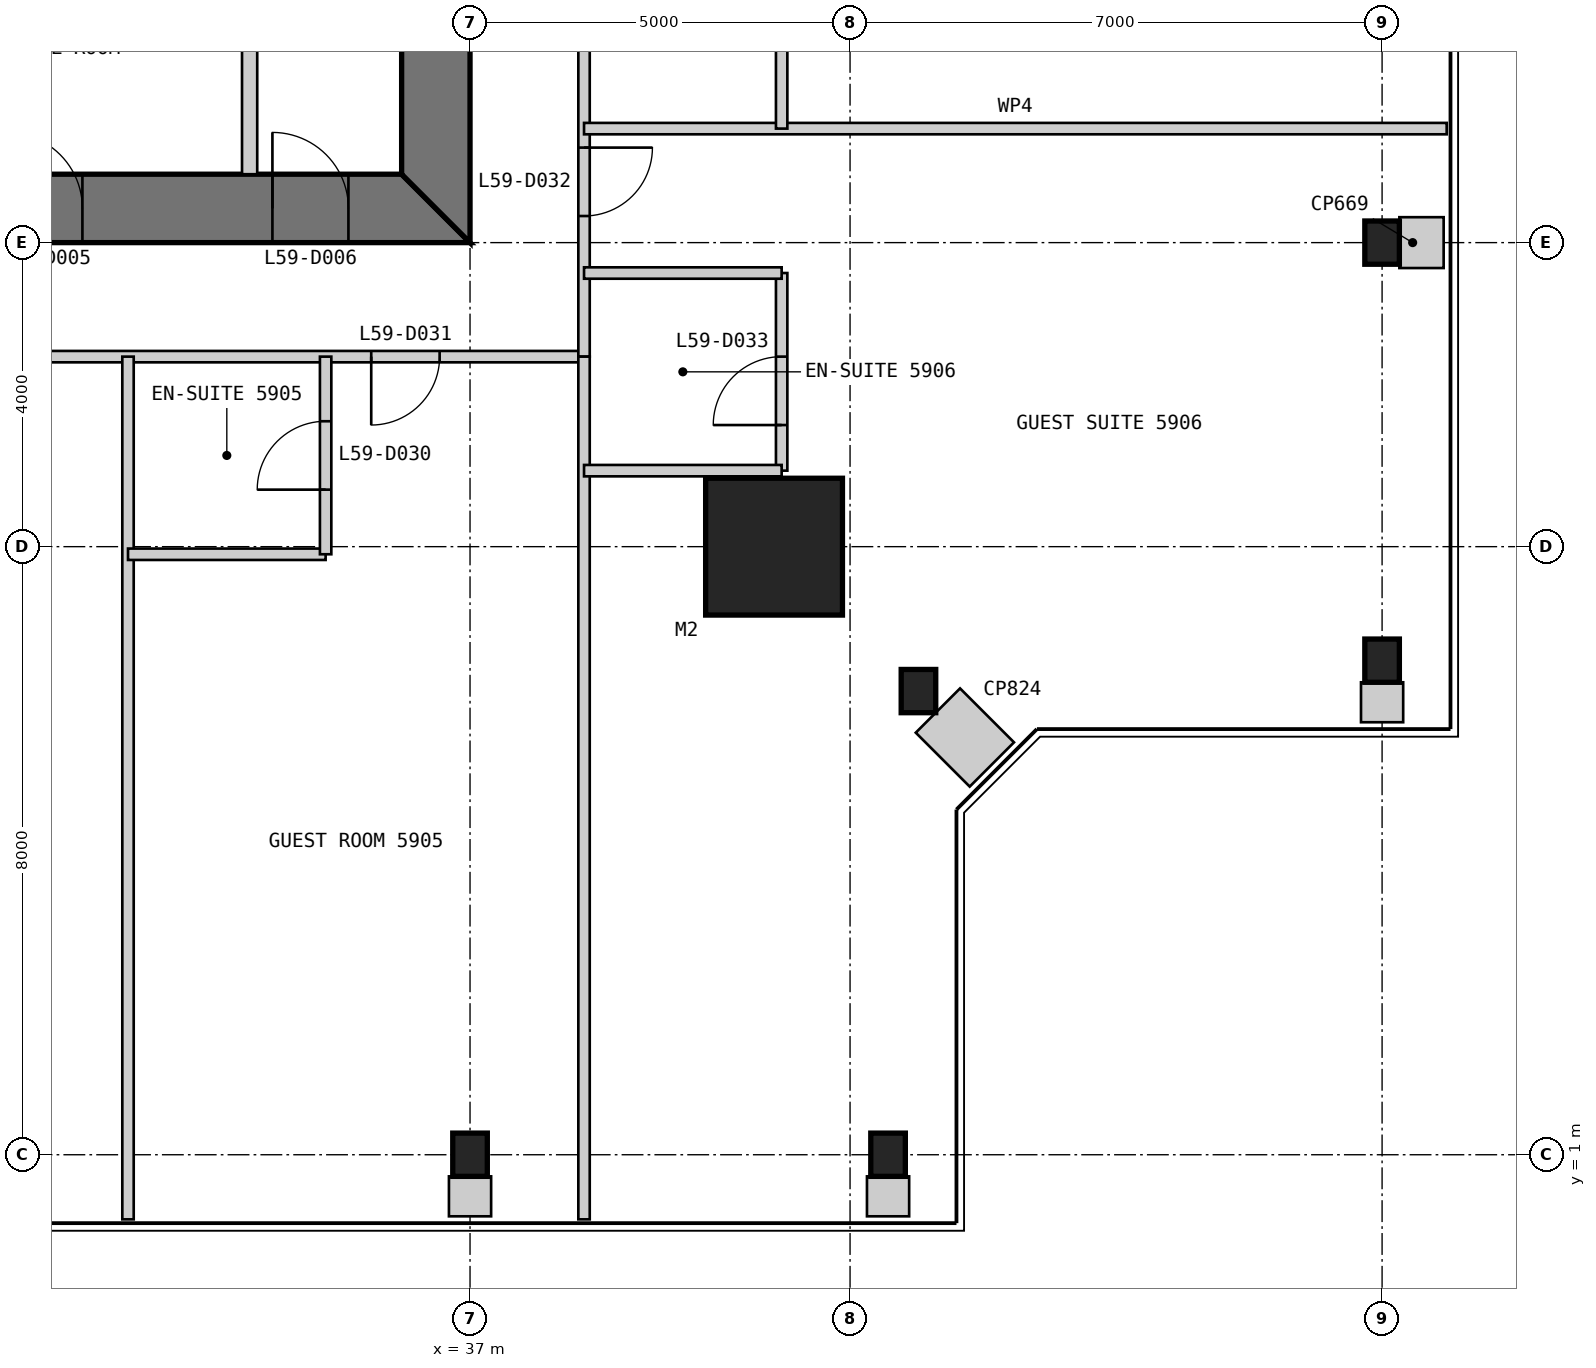
"""IFC4 building model, lengths in metres.
Left out: names, types, materials, properties, quantities, classifications, styles, units other than length and angle.
Written with IfcOpenShell. Run it as: python <this file> out.ifc"""

import sys

from ifc_helpers import new_model, si_unit, direction, frame, frame_2d, origin, origin_2d, place, context, subcontext, project, spatial, polyline, rectangle, i_section, outline, extrude, element, fill, save


model = new_model("IFC4")
c1 = context("Model", 3, precision=1e-05, world=origin(), true_north=direction((0.0, 1.0)))
c2 = subcontext(c1, "Body", "Model", "MODEL_VIEW")
j1 = project(units=[si_unit("LENGTHUNIT", "METRE"), si_unit("PLANEANGLEUNIT", "RADIAN")], contexts=[c1])
p1 = place(None, origin())
s1 = spatial("IfcSite", under=j1, at=p1, CompositionType="ELEMENT")
p2 = place(p1, origin())
s2 = spatial("IfcBuilding", under=s1, at=p2, CompositionType="ELEMENT")
p3 = place(p2, frame((0.0, 0.0, 252.6)))
s3 = spatial("IfcBuildingStorey", under=s2, at=p3, CompositionType="ELEMENT", Elevation=252.6)
p4 = place(p3, frame((41.0, 9.0, 0.0), z_axis=(0.0, 0.0, 1.0), x_axis=(1.0, 0.0, 0.0)))
e1 = element("IfcColumn", 1, at=p4, inside=s3, PredefinedType="COLUMN", context=c2, shape_type="SweptSolid", body=[
    extrude(rectangle(XDim=1.8, YDim=1.8, at=origin_2d()), origin(), (0.0, 0.0, 1.0), 3.4),
])
for number, where, z_axis, x_axis in (
    (2, (37.0, 1.0, 0.0), (0.0, 0.0, 1.0), (1.0, 0.0, 0.0)),
    (3, (42.5, 1.0, 0.0), (0.0, 0.0, 1.0), (1.0, 0.0, 0.0)),
    (4, (42.9, 7.1, 0.0), (0.0, 0.0, 1.0), (1.0, 0.0, 0.0)),
    (5, (49.0, 7.5, 0.0), (0.0, 0.0, 1.0), (1.0, 0.0, 0.0)),
    (6, (49.0, 13.0, 0.0), (0.0, 0.0, 1.0), (1.0, 0.0, 0.0)),
):
    element("IfcColumn", number, at=place(p3, frame(where, z_axis=z_axis, x_axis=x_axis)), inside=s3, PredefinedType="COLUMN", context=c2, shape_type="SweptSolid", body=[
        extrude(i_section(OverallWidth=0.455, OverallDepth=0.569, WebThickness=0.078, FlangeThickness=0.125, at=origin_2d()), origin(), (0.0, 0.0, 1.0), 3.4),
    ])
p5 = place(p3, frame((13.0, 13.45, 0.0), z_axis=(0.0, 0.0, 1.0), x_axis=(1.0, 0.0, 0.0)))
e7 = element("IfcWall", 7, at=p5, inside=s3, PredefinedType="SHEAR", context=c2, shape_type="SweptSolid", body=[
    extrude(outline(polyline([(0.0, -0.45), (24.0, -0.45), (23.1, 0.45), (0.9, 0.45), (0.0, -0.45)])), origin(), (0.0, 0.0, 1.0), 3.4),
])
p6 = place(p5, frame((4.9, 0.0, 0.0)))
e8 = element("IfcOpeningElement", 8, at=p6, cuts=e7, PredefinedType="OPENING", context=c2, shape_type="SweptSolid", body=[
    extrude(rectangle(XDim=1.0, YDim=2.2, at=frame_2d((0.5, 1.1))), frame((0.0, 0.46, 0.0), z_axis=(0.0, -1.0, 0.0), x_axis=(1.0, 0.0, 0.0)), (0.0, 0.0, 1.0), 0.92),
])
p7 = place(p5, frame((8.9, 0.0, 0.0)))
e9 = element("IfcOpeningElement", 9, at=p7, cuts=e7, PredefinedType="OPENING", context=c2, shape_type="SweptSolid", body=[
    extrude(rectangle(XDim=1.1, YDim=2.2, at=frame_2d((0.55, 1.1))), frame((0.0, 0.46, 0.0), z_axis=(0.0, -1.0, 0.0), x_axis=(1.0, 0.0, 0.0)), (0.0, 0.0, 1.0), 0.92),
])
p8 = place(p5, frame((15.05, 0.0, 0.0)))
e10 = element("IfcOpeningElement", 10, at=p8, cuts=e7, PredefinedType="OPENING", context=c2, shape_type="SweptSolid", body=[
    extrude(rectangle(XDim=0.9, YDim=2.2, at=frame_2d((0.45, 1.1))), frame((0.0, 0.46, 0.0), z_axis=(0.0, -1.0, 0.0), x_axis=(1.0, 0.0, 0.0)), (0.0, 0.0, 1.0), 0.92),
])
p9 = place(p5, frame((17.9, 0.0, 0.0)))
e11 = element("IfcOpeningElement", 11, at=p9, cuts=e7, PredefinedType="OPENING", context=c2, shape_type="SweptSolid", body=[
    extrude(rectangle(XDim=1.0, YDim=2.2, at=frame_2d((0.5, 1.1))), frame((0.0, 0.46, 0.0), z_axis=(0.0, -1.0, 0.0), x_axis=(1.0, 0.0, 0.0)), (0.0, 0.0, 1.0), 0.92),
])
p10 = place(p5, frame((21.4, 0.0, 0.0)))
e12 = element("IfcOpeningElement", 12, at=p10, cuts=e7, PredefinedType="OPENING", context=c2, shape_type="SweptSolid", body=[
    extrude(rectangle(XDim=1.0, YDim=2.2, at=frame_2d((0.5, 1.1))), frame((0.0, 0.46, 0.0), z_axis=(0.0, -1.0, 0.0), x_axis=(1.0, 0.0, 0.0)), (0.0, 0.0, 1.0), 0.92),
])
p11 = place(p3, frame((36.55, 13.9, 0.0), z_axis=(0.0, 0.0, 1.0), x_axis=(0.0, 1.0, 0.0)))
e13 = element("IfcWall", 13, at=p11, inside=s3, PredefinedType="SHEAR", context=c2, shape_type="SweptSolid", body=[
    extrude(outline(polyline([(-0.9, -0.45), (23.1, -0.45), (22.2, 0.45), (0.0, 0.45), (-0.9, -0.45)])), origin(), (0.0, 0.0, 1.0), 3.4),
])
p12 = place(p11, frame((20.2, 0.0, 0.0)))
e14 = element("IfcOpeningElement", 14, at=p12, cuts=e13, PredefinedType="OPENING", context=c2, shape_type="SweptSolid", body=[
    extrude(rectangle(XDim=1.0, YDim=2.2, at=frame_2d((0.5, 1.1))), frame((0.0, 0.46, 0.0), z_axis=(0.0, -1.0, 0.0), x_axis=(1.0, 0.0, 0.0)), (0.0, 0.0, 1.0), 0.92),
])
p13 = place(p11, frame((17.25, 0.0, 0.0)))
e15 = element("IfcOpeningElement", 15, at=p13, cuts=e13, PredefinedType="OPENING", context=c2, shape_type="SweptSolid", body=[
    extrude(rectangle(XDim=0.9, YDim=2.2, at=frame_2d((0.45, 1.1))), frame((0.0, 0.46, 0.0), z_axis=(0.0, -1.0, 0.0), x_axis=(1.0, 0.0, 0.0)), (0.0, 0.0, 1.0), 0.92),
])
p14 = place(p3, frame((34.1, 13.9, 0.0), z_axis=(0.0, 0.0, 1.0), x_axis=(0.0, 1.0, 0.0)))
e16 = element("IfcWall", 16, at=p14, inside=s3, PredefinedType="PARTITIONING", context=c2, shape_type="SweptSolid", body=[
    extrude(rectangle(XDim=6.1, YDim=0.2, at=frame_2d((3.05, 0.0))), origin(), (0.0, 0.0, 1.0), 3.2),
])
p15 = place(p3, frame((11.5, 11.5, 0.0), z_axis=(0.0, 0.0, 1.0), x_axis=(1.0, 0.0, 0.0)))
e17 = element("IfcWall", 17, at=p15, inside=s3, PredefinedType="PARTITIONING", context=c2, shape_type="SweptSolid", body=[
    extrude(rectangle(XDim=27.0, YDim=0.15, at=frame_2d((13.5, 0.0))), origin(), (0.0, 0.0, 1.0), 3.25),
])
p16 = place(p15, frame((1.85, 0.0, 0.0)))
e18 = element("IfcOpeningElement", 18, at=p16, cuts=e17, PredefinedType="OPENING", context=c2, shape_type="SweptSolid", body=[
    extrude(rectangle(XDim=0.9, YDim=2.1, at=frame_2d((0.45, 1.05))), frame((0.0, 0.085, 0.0), z_axis=(0.0, -1.0, 0.0), x_axis=(1.0, 0.0, 0.0)), (0.0, 0.0, 1.0), 0.17),
])
p17 = place(p15, frame((6.2, 0.0, 0.0)))
e19 = element("IfcOpeningElement", 19, at=p17, cuts=e17, PredefinedType="OPENING", context=c2, shape_type="SweptSolid", body=[
    extrude(rectangle(XDim=0.9, YDim=2.1, at=frame_2d((0.45, 1.05))), frame((0.0, 0.085, 0.0), z_axis=(0.0, -1.0, 0.0), x_axis=(1.0, 0.0, 0.0)), (0.0, 0.0, 1.0), 0.17),
])
p18 = place(p15, frame((12.2, 0.0, 0.0)))
e20 = element("IfcOpeningElement", 20, at=p18, cuts=e17, PredefinedType="OPENING", context=c2, shape_type="SweptSolid", body=[
    extrude(rectangle(XDim=0.9, YDim=2.1, at=frame_2d((0.45, 1.05))), frame((0.0, 0.085, 0.0), z_axis=(0.0, -1.0, 0.0), x_axis=(1.0, 0.0, 0.0)), (0.0, 0.0, 1.0), 0.17),
])
p19 = place(p15, frame((18.8, 0.0, 0.0)))
e21 = element("IfcOpeningElement", 21, at=p19, cuts=e17, PredefinedType="OPENING", context=c2, shape_type="SweptSolid", body=[
    extrude(rectangle(XDim=1.0, YDim=2.1, at=frame_2d((0.5, 1.05))), frame((0.0, 0.085, 0.0), z_axis=(0.0, -1.0, 0.0), x_axis=(1.0, 0.0, 0.0)), (0.0, 0.0, 1.0), 0.17),
])
p20 = place(p15, frame((24.2, 0.0, 0.0)))
e22 = element("IfcOpeningElement", 22, at=p20, cuts=e17, PredefinedType="OPENING", context=c2, shape_type="SweptSolid", body=[
    extrude(rectangle(XDim=0.9, YDim=2.1, at=frame_2d((0.45, 1.05))), frame((0.0, 0.085, 0.0), z_axis=(0.0, -1.0, 0.0), x_axis=(1.0, 0.0, 0.0)), (0.0, 0.0, 1.0), 0.17),
])
p21 = place(p3, frame((32.5, 0.15, 0.0), z_axis=(0.0, 0.0, 1.0), x_axis=(0.0, 1.0, 0.0)))
e23 = element("IfcWall", 23, at=p21, inside=s3, PredefinedType="PARTITIONING", context=c2, shape_type="SweptSolid", body=[
    extrude(rectangle(XDim=11.35, YDim=0.15, at=frame_2d((5.675, 0.0))), origin(), (0.0, 0.0, 1.0), 3.25),
])
p22 = place(p3, frame((32.5, 8.9, 0.0), z_axis=(0.0, 0.0, 1.0), x_axis=(1.0, 0.0, 0.0)))
e24 = element("IfcWall", 24, at=p22, inside=s3, PredefinedType="PARTITIONING", context=c2, shape_type="SweptSolid", body=[
    extrude(rectangle(XDim=2.6, YDim=0.15, at=frame_2d((1.3, 0.0))), origin(), (0.0, 0.0, 1.0), 3.25),
])
p23 = place(p3, frame((35.1, 8.9, 0.0), z_axis=(0.0, 0.0, 1.0), x_axis=(0.0, 1.0, 0.0)))
e25 = element("IfcWall", 25, at=p23, inside=s3, PredefinedType="PARTITIONING", context=c2, shape_type="SweptSolid", body=[
    extrude(rectangle(XDim=2.6, YDim=0.15, at=frame_2d((1.3, 0.0))), origin(), (0.0, 0.0, 1.0), 3.25),
])
p24 = place(p23, frame((0.85, 0.0, 0.0)))
e26 = element("IfcOpeningElement", 26, at=p24, cuts=e25, PredefinedType="OPENING", context=c2, shape_type="SweptSolid", body=[
    extrude(rectangle(XDim=0.9, YDim=2.1, at=frame_2d((0.45, 1.05))), frame((0.0, 0.085, 0.0), z_axis=(0.0, -1.0, 0.0), x_axis=(1.0, 0.0, 0.0)), (0.0, 0.0, 1.0), 0.17),
])
p25 = place(p3, frame((38.5, 11.5, 0.0), z_axis=(0.0, 0.0, 1.0), x_axis=(0.0, 1.0, 0.0)))
e27 = element("IfcWall", 27, at=p25, inside=s3, PredefinedType="PARTITIONING", context=c2, shape_type="SweptSolid", body=[
    extrude(rectangle(XDim=27.0, YDim=0.15, at=frame_2d((13.5, 0.0))), origin(), (0.0, 0.0, 1.0), 3.25),
])
p26 = place(p25, frame((1.85, 0.0, 0.0)))
e28 = element("IfcOpeningElement", 28, at=p26, cuts=e27, PredefinedType="OPENING", context=c2, shape_type="SweptSolid", body=[
    extrude(rectangle(XDim=0.9, YDim=2.1, at=frame_2d((0.45, 1.05))), frame((0.0, 0.085, 0.0), z_axis=(0.0, -1.0, 0.0), x_axis=(1.0, 0.0, 0.0)), (0.0, 0.0, 1.0), 0.17),
])
p27 = place(p25, frame((6.2, 0.0, 0.0)))
e29 = element("IfcOpeningElement", 29, at=p27, cuts=e27, PredefinedType="OPENING", context=c2, shape_type="SweptSolid", body=[
    extrude(rectangle(XDim=0.9, YDim=2.1, at=frame_2d((0.45, 1.05))), frame((0.0, 0.085, 0.0), z_axis=(0.0, -1.0, 0.0), x_axis=(1.0, 0.0, 0.0)), (0.0, 0.0, 1.0), 0.17),
])
p28 = place(p25, frame((12.2, 0.0, 0.0)))
e30 = element("IfcOpeningElement", 30, at=p28, cuts=e27, PredefinedType="OPENING", context=c2, shape_type="SweptSolid", body=[
    extrude(rectangle(XDim=0.9, YDim=2.1, at=frame_2d((0.45, 1.05))), frame((0.0, 0.085, 0.0), z_axis=(0.0, -1.0, 0.0), x_axis=(1.0, 0.0, 0.0)), (0.0, 0.0, 1.0), 0.17),
])
p29 = place(p25, frame((18.2, 0.0, 0.0)))
e31 = element("IfcOpeningElement", 31, at=p29, cuts=e27, PredefinedType="OPENING", context=c2, shape_type="SweptSolid", body=[
    extrude(rectangle(XDim=0.9, YDim=2.1, at=frame_2d((0.45, 1.05))), frame((0.0, 0.085, 0.0), z_axis=(0.0, -1.0, 0.0), x_axis=(1.0, 0.0, 0.0)), (0.0, 0.0, 1.0), 0.17),
])
p30 = place(p25, frame((24.2, 0.0, 0.0)))
e32 = element("IfcOpeningElement", 32, at=p30, cuts=e27, PredefinedType="OPENING", context=c2, shape_type="SweptSolid", body=[
    extrude(rectangle(XDim=0.9, YDim=2.1, at=frame_2d((0.45, 1.05))), frame((0.0, 0.085, 0.0), z_axis=(0.0, -1.0, 0.0), x_axis=(1.0, 0.0, 0.0)), (0.0, 0.0, 1.0), 0.17),
])
p31 = place(p3, frame((38.5, 0.15, 0.0), z_axis=(0.0, 0.0, 1.0), x_axis=(0.0, 1.0, 0.0)))
e33 = element("IfcWall", 33, at=p31, inside=s3, PredefinedType="PARTITIONING", context=c2, shape_type="SweptSolid", body=[
    extrude(rectangle(XDim=11.35, YDim=0.15, at=frame_2d((5.675, 0.0))), origin(), (0.0, 0.0, 1.0), 3.25),
])
p32 = place(p3, frame((41.1, 10.0, 0.0), z_axis=(0.0, 0.0, 1.0), x_axis=(0.0, 1.0, 0.0)))
e34 = element("IfcWall", 34, at=p32, inside=s3, PredefinedType="PARTITIONING", context=c2, shape_type="SweptSolid", body=[
    extrude(rectangle(XDim=2.6, YDim=0.15, at=frame_2d((1.3, 0.0))), origin(), (0.0, 0.0, 1.0), 2.638),
])
p33 = place(p32, frame((0.6, 0.0, 0.0)))
e35 = element("IfcOpeningElement", 35, at=p33, cuts=e34, PredefinedType="OPENING", context=c2, shape_type="SweptSolid", body=[
    extrude(rectangle(XDim=0.9, YDim=2.1, at=frame_2d((0.45, 1.05))), frame((0.0, 0.085, 0.0), z_axis=(0.0, -1.0, 0.0), x_axis=(1.0, 0.0, 0.0)), (0.0, 0.0, 1.0), 0.17),
])
for number, where, z_axis, x_axis in (
    (36, (41.1, 10.0, 0.0), (0.0, 0.0, 1.0), (-1.0, 0.0, 0.0)),
    (37, (41.1, 12.6, 0.0), (0.0, 0.0, 1.0), (-1.0, 0.0, 0.0)),
):
    element("IfcWall", number, at=place(p3, frame(where, z_axis=z_axis, x_axis=x_axis)), inside=s3, PredefinedType="PARTITIONING", context=c2, shape_type="SweptSolid", body=[
        extrude(rectangle(XDim=2.6, YDim=0.15, at=frame_2d((1.3, 0.0))), origin(), (0.0, 0.0, 1.0), 3.25),
    ])
p34 = place(p3, frame((49.85, 14.5, 0.0), z_axis=(0.0, 0.0, 1.0), x_axis=(-1.0, 0.0, 0.0)))
e38 = element("IfcWall", 38, at=p34, inside=s3, PredefinedType="PARTITIONING", context=c2, shape_type="SweptSolid", body=[
    extrude(rectangle(XDim=11.35, YDim=0.15, at=frame_2d((5.675, 0.0))), origin(), (0.0, 0.0, 1.0), 3.25),
])
p35 = place(p3, frame((41.1, 14.5, 0.0), z_axis=(0.0, 0.0, 1.0), x_axis=(0.0, 1.0, 0.0)))
e39 = element("IfcWall", 39, at=p35, inside=s3, PredefinedType="PARTITIONING", context=c2, shape_type="SweptSolid", body=[
    extrude(rectangle(XDim=2.6, YDim=0.15, at=frame_2d((1.3, 0.0))), origin(), (0.0, 0.0, 1.0), 3.25),
])
for number, where, z_axis, x_axis in (
    (40, (37.0, 0.19, 0.0), (0.0, 0.0, 1.0), (0.0, 1.0, 0.0)),
    (41, (42.5, 0.19, 0.0), (0.0, 0.0, 1.0), (0.0, 1.0, 0.0)),
):
    element("IfcWall", number, at=place(p3, frame(where, z_axis=z_axis, x_axis=x_axis)), inside=s3, PredefinedType="PARTITIONING", context=c2, shape_type="SweptSolid", body=[
        extrude(rectangle(XDim=0.526, YDim=0.555, at=frame_2d((0.263, 0.0))), origin(), (0.0, 0.0, 1.0), 3.25),
    ])
p36 = place(p3, frame((43.866, 6.134, 0.0), z_axis=(0.0, 0.0, 1.0), x_axis=(-0.707106781187, 0.707106781187, 0.0)))
e42 = element("IfcWall", 42, at=p36, inside=s3, PredefinedType="PARTITIONING", context=c2, shape_type="SweptSolid", body=[
    extrude(rectangle(XDim=1.004, YDim=0.824, at=frame_2d((0.502, 0.0))), origin(), (0.0, 0.0, 1.0), 3.25),
])
p37 = place(p3, frame((49.0, 6.69, 0.0), z_axis=(0.0, 0.0, 1.0), x_axis=(0.0, 1.0, 0.0)))
e43 = element("IfcWall", 43, at=p37, inside=s3, PredefinedType="PARTITIONING", context=c2, shape_type="SweptSolid", body=[
    extrude(rectangle(XDim=0.526, YDim=0.555, at=frame_2d((0.263, 0.0))), origin(), (0.0, 0.0, 1.0), 3.25),
])
p38 = place(p3, frame((49.81, 13.0, 0.0), z_axis=(0.0, 0.0, 1.0), x_axis=(-1.0, 0.0, 0.0)))
e44 = element("IfcWall", 44, at=p38, inside=s3, PredefinedType="PARTITIONING", context=c2, shape_type="SweptSolid", body=[
    extrude(rectangle(XDim=0.583, YDim=0.669, at=frame_2d((0.292, 0.0))), origin(), (0.0, 0.0, 1.0), 3.25),
])
p39 = place(p9, origin())
e45 = element("IfcDoor", 45, at=p39, inside=s3, OperationType="SINGLE_SWING_LEFT", PredefinedType="DOOR", context=c2, shape_type="SweptSolid", body=[
    extrude(rectangle(XDim=1.0, YDim=2.2, at=frame_2d((0.5, 1.1))), frame((0.0, 0.025, 0.0), z_axis=(0.0, -1.0, 0.0), x_axis=(1.0, 0.0, 0.0)), (0.0, 0.0, 1.0), 0.05),
    extrude(outline(polyline([(0.0, 0.0), (0.04, 0.0), (0.04, 2.16), (0.96, 2.16), (0.96, 0.0), (1.0, 0.0), (1.0, 2.2), (0.0, 2.2), (0.0, 0.0)])), frame((0.0, 0.3, 0.0), z_axis=(0.0, -1.0, 0.0), x_axis=(1.0, 0.0, 0.0)), (0.0, 0.0, 1.0), 0.6),
])
fill(e11, e45)
p40 = place(p10, origin())
e46 = element("IfcDoor", 46, at=p40, inside=s3, OperationType="SINGLE_SWING_LEFT", PredefinedType="DOOR", context=c2, shape_type="SweptSolid", body=[
    extrude(rectangle(XDim=1.0, YDim=2.2, at=frame_2d((0.5, 1.1))), frame((0.0, 0.025, 0.0), z_axis=(0.0, -1.0, 0.0), x_axis=(1.0, 0.0, 0.0)), (0.0, 0.0, 1.0), 0.05),
    extrude(outline(polyline([(0.0, 0.0), (0.04, 0.0), (0.04, 2.16), (0.96, 2.16), (0.96, 0.0), (1.0, 0.0), (1.0, 2.2), (0.0, 2.2), (0.0, 0.0)])), frame((0.0, 0.3, 0.0), z_axis=(0.0, -1.0, 0.0), x_axis=(1.0, 0.0, 0.0)), (0.0, 0.0, 1.0), 0.6),
])
fill(e12, e46)
p41 = place(p24, origin())
e47 = element("IfcDoor", 47, at=p41, inside=s3, OperationType="SINGLE_SWING_LEFT", PredefinedType="DOOR", context=c2, shape_type="SweptSolid", body=[
    extrude(rectangle(XDim=0.9, YDim=2.1, at=frame_2d((0.45, 1.05))), frame((0.0, 0.025, 0.0), z_axis=(0.0, -1.0, 0.0), x_axis=(1.0, 0.0, 0.0)), (0.0, 0.0, 1.0), 0.05),
])
fill(e26, e47)
p42 = place(p20, frame((0.9, 0.0, 0.0), z_axis=(0.0, 0.0, 1.0), x_axis=(-1.0, 0.0, 0.0)))
e48 = element("IfcDoor", 48, at=p42, inside=s3, OperationType="SINGLE_SWING_RIGHT", PredefinedType="DOOR", context=c2, shape_type="SweptSolid", body=[
    extrude(rectangle(XDim=0.9, YDim=2.1, at=frame_2d((0.45, 1.05))), frame((0.0, 0.025, 0.0), z_axis=(0.0, -1.0, 0.0), x_axis=(1.0, 0.0, 0.0)), (0.0, 0.0, 1.0), 0.05),
])
fill(e22, e48)
p43 = place(p26, frame((0.9, 0.0, 0.0), z_axis=(0.0, 0.0, 1.0), x_axis=(-1.0, 0.0, 0.0)))
e49 = element("IfcDoor", 49, at=p43, inside=s3, OperationType="SINGLE_SWING_LEFT", PredefinedType="DOOR", context=c2, shape_type="SweptSolid", body=[
    extrude(rectangle(XDim=0.9, YDim=2.1, at=frame_2d((0.45, 1.05))), frame((0.0, 0.025, 0.0), z_axis=(0.0, -1.0, 0.0), x_axis=(1.0, 0.0, 0.0)), (0.0, 0.0, 1.0), 0.05),
])
fill(e28, e49)
p44 = place(p33, origin())
e50 = element("IfcDoor", 50, at=p44, inside=s3, OperationType="SINGLE_SWING_LEFT", PredefinedType="DOOR", context=c2, shape_type="SweptSolid", body=[
    extrude(rectangle(XDim=0.9, YDim=2.1, at=frame_2d((0.45, 1.05))), frame((0.0, 0.025, 0.0), z_axis=(0.0, -1.0, 0.0), x_axis=(1.0, 0.0, 0.0)), (0.0, 0.0, 1.0), 0.05),
])
fill(e35, e50)
save(model, sys.argv[1])
